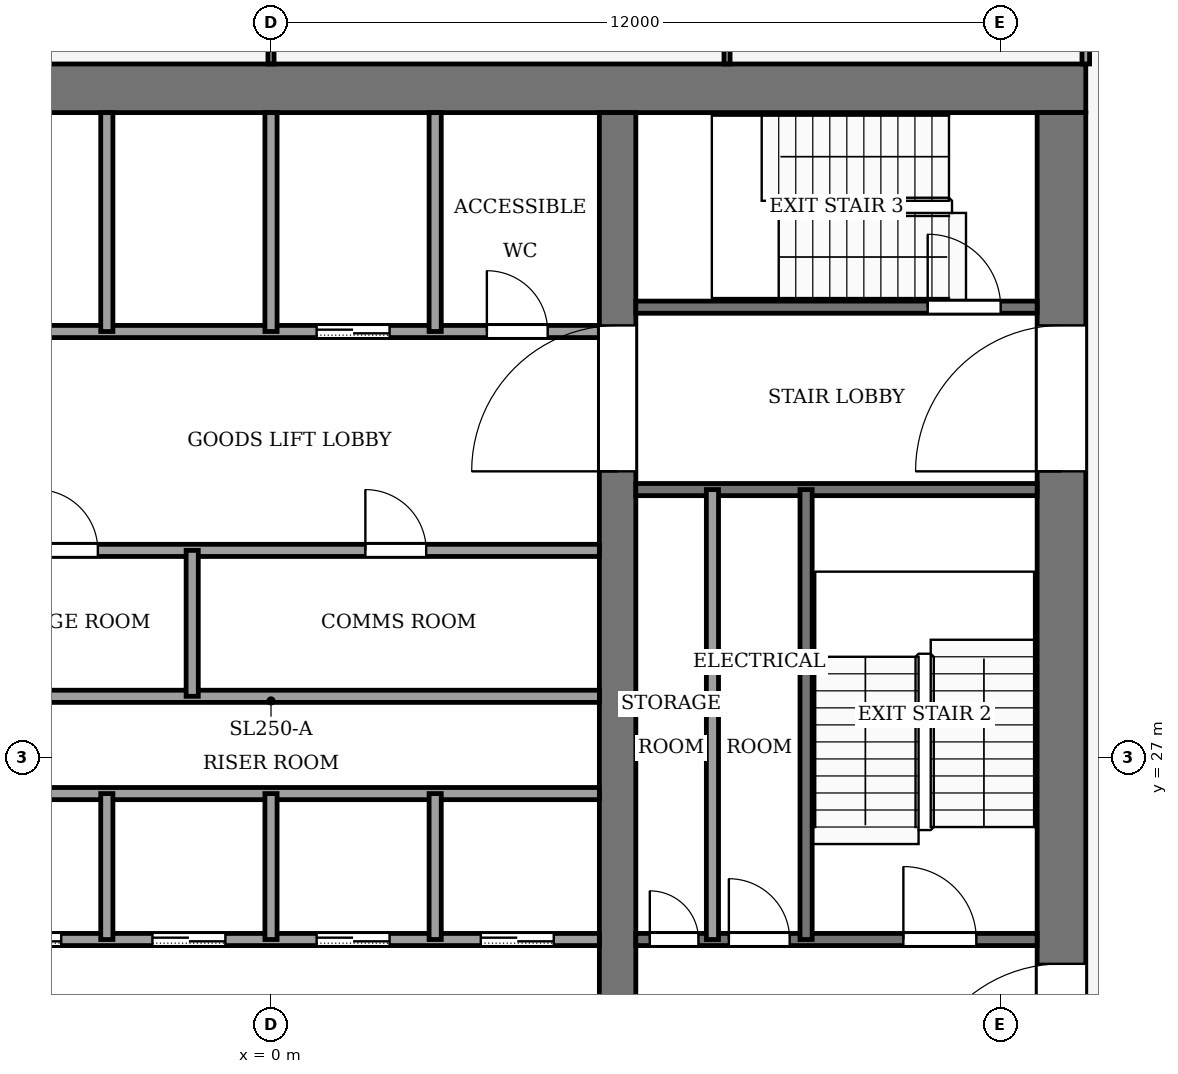
"""IFC4 building model, lengths in metres.
Left out: names, types, materials, properties, quantities, classifications, styles, units other than length and angle.
Written with IfcOpenShell. Run it as: python <this file> out.ifc"""

import sys

from ifc_helpers import new_model, si_unit, direction, frame, frame_2d, origin, place, context, subcontext, project, spatial, rectangle, extrude, element, fill, save


model = new_model("IFC4")
c1 = context("Model", 3, precision=1e-05, world=origin(), true_north=direction((0.0, 1.0)))
c2 = subcontext(c1, "Body", "Model", "MODEL_VIEW")
j1 = project(units=[si_unit("LENGTHUNIT", "METRE"), si_unit("PLANEANGLEUNIT", "RADIAN")], contexts=[c1])
p1 = place(None, origin())
s1 = spatial("IfcSite", under=j1, at=p1, CompositionType="ELEMENT")
p2 = place(p1, origin())
s2 = spatial("IfcBuilding", under=s1, at=p2, CompositionType="ELEMENT")
p3 = place(p2, frame((0.0, 0.0, 250.0)))
s3 = spatial("IfcBuildingStorey", under=s2, at=p3, CompositionType="ELEMENT", Elevation=250.0)
p4 = place(p3, frame((-13.4, 38.0, -0.13), z_axis=(0.0, 0.0, 1.0), x_axis=(1.0, 0.0, 0.0)))
e1 = element("IfcWall", 1, at=p4, inside=s3, PredefinedType="SHEAR", context=c2, shape_type="SweptSolid", body=[
    extrude(rectangle(XDim=26.8, YDim=0.8, at=frame_2d((13.4, 0.0))), origin(), (0.0, 0.0, 1.0), 4.0),
])
p5 = place(p3, frame((13.0, 18.4, -0.13), z_axis=(0.0, 0.0, 1.0), x_axis=(0.0, 1.0, 0.0)))
e2 = element("IfcWall", 2, at=p5, inside=s3, PredefinedType="SHEAR", context=c2, shape_type="SweptSolid", body=[
    extrude(rectangle(XDim=19.2, YDim=0.8, at=frame_2d((9.6, 0.0))), origin(), (0.0, 0.0, 1.0), 4.0),
])
p6 = place(p5, frame((2.8, 0.0, 0.13)))
e3 = element("IfcOpeningElement", 3, at=p6, cuts=e2, PredefinedType="OPENING", context=c2, shape_type="SweptSolid", body=[
    extrude(rectangle(XDim=2.4, YDim=2.4, at=frame_2d((1.2, 1.2))), frame((0.0, 0.41, 0.0), z_axis=(0.0, -1.0, 0.0), x_axis=(1.0, 0.0, 0.0)), (0.0, 0.0, 1.0), 0.82),
])
p7 = place(p5, frame((13.3, 0.0, 0.13)))
e4 = element("IfcOpeningElement", 4, at=p7, cuts=e2, PredefinedType="OPENING", context=c2, shape_type="SweptSolid", body=[
    extrude(rectangle(XDim=2.4, YDim=2.4, at=frame_2d((1.2, 1.2))), frame((0.0, 0.41, 0.0), z_axis=(0.0, -1.0, 0.0), x_axis=(1.0, 0.0, 0.0)), (0.0, 0.0, 1.0), 0.82),
])
p8 = place(p3, frame((5.7, 18.4, -0.13), z_axis=(0.0, 0.0, 1.0), x_axis=(0.0, 1.0, 0.0)))
e5 = element("IfcWall", 5, at=p8, inside=s3, PredefinedType="SHEAR", context=c2, shape_type="SweptSolid", body=[
    extrude(rectangle(XDim=19.2, YDim=0.6, at=frame_2d((9.6, 0.0))), origin(), (0.0, 0.0, 1.0), 4.0),
])
p9 = place(p8, frame((13.3, 0.0, 0.13)))
e6 = element("IfcOpeningElement", 6, at=p9, cuts=e5, PredefinedType="OPENING", context=c2, shape_type="SweptSolid", body=[
    extrude(rectangle(XDim=2.4, YDim=2.4, at=frame_2d((1.2, 1.2))), frame((0.0, 0.31, 0.0), z_axis=(0.0, -1.0, 0.0), x_axis=(1.0, 0.0, 0.0)), (0.0, 0.0, 1.0), 0.62),
])
p10 = place(p3, frame((-5.4, 24.0, 0.0), z_axis=(0.0, 0.0, 1.0), x_axis=(1.0, 0.0, 0.0)))
e7 = element("IfcWall", 7, at=p10, inside=s3, PredefinedType="PARTITIONING", context=c2, shape_type="SweptSolid", body=[
    extrude(rectangle(XDim=10.8, YDim=0.2, at=frame_2d((5.4, 0.0))), origin(), (0.0, 0.0, 1.0), 3.87),
])
p11 = place(p10, frame((0.75, 0.0, 0.0)))
e8 = element("IfcOpeningElement", 8, at=p11, cuts=e7, PredefinedType="OPENING", context=c2, shape_type="SweptSolid", body=[
    extrude(rectangle(XDim=1.2, YDim=2.2, at=frame_2d((0.6, 1.1))), frame((0.0, 0.11, 0.0), z_axis=(0.0, -1.0, 0.0), x_axis=(1.0, 0.0, 0.0)), (0.0, 0.0, 1.0), 0.22),
])
p12 = place(p10, frame((3.45, 0.0, 0.0)))
e9 = element("IfcOpeningElement", 9, at=p12, cuts=e7, PredefinedType="OPENING", context=c2, shape_type="SweptSolid", body=[
    extrude(rectangle(XDim=1.2, YDim=2.2, at=frame_2d((0.6, 1.1))), frame((0.0, 0.11, 0.0), z_axis=(0.0, -1.0, 0.0), x_axis=(1.0, 0.0, 0.0)), (0.0, 0.0, 1.0), 0.22),
])
p13 = place(p10, frame((6.15, 0.0, 0.0)))
e10 = element("IfcOpeningElement", 10, at=p13, cuts=e7, PredefinedType="OPENING", context=c2, shape_type="SweptSolid", body=[
    extrude(rectangle(XDim=1.2, YDim=2.2, at=frame_2d((0.6, 1.1))), frame((0.0, 0.11, 0.0), z_axis=(0.0, -1.0, 0.0), x_axis=(1.0, 0.0, 0.0)), (0.0, 0.0, 1.0), 0.22),
])
p14 = place(p10, frame((8.85, 0.0, 0.0)))
e11 = element("IfcOpeningElement", 11, at=p14, cuts=e7, PredefinedType="OPENING", context=c2, shape_type="SweptSolid", body=[
    extrude(rectangle(XDim=1.2, YDim=2.2, at=frame_2d((0.6, 1.1))), frame((0.0, 0.11, 0.0), z_axis=(0.0, -1.0, 0.0), x_axis=(1.0, 0.0, 0.0)), (0.0, 0.0, 1.0), 0.22),
])
p15 = place(p3, frame((6.0, 24.0, 0.0), z_axis=(0.0, 0.0, 1.0), x_axis=(1.0, 0.0, 0.0)))
e12 = element("IfcWall", 12, at=p15, inside=s3, PredefinedType="PARTITIONING", context=c2, shape_type="SweptSolid", body=[
    extrude(rectangle(XDim=6.6, YDim=0.2, at=frame_2d((3.3, 0.0))), origin(), (0.0, 0.0, 1.0), 3.87),
])
p16 = place(p15, frame((0.23, 0.0, 0.0)))
e13 = element("IfcOpeningElement", 13, at=p16, cuts=e12, PredefinedType="OPENING", context=c2, shape_type="SweptSolid", body=[
    extrude(rectangle(XDim=0.8, YDim=2.1, at=frame_2d((0.4, 1.05))), frame((0.0, 0.11, 0.0), z_axis=(0.0, -1.0, 0.0), x_axis=(1.0, 0.0, 0.0)), (0.0, 0.0, 1.0), 0.22),
])
p17 = place(p15, frame((1.53, 0.0, 0.0)))
e14 = element("IfcOpeningElement", 14, at=p17, cuts=e12, PredefinedType="OPENING", context=c2, shape_type="SweptSolid", body=[
    extrude(rectangle(XDim=1.0, YDim=2.1, at=frame_2d((0.5, 1.05))), frame((0.0, 0.11, 0.0), z_axis=(0.0, -1.0, 0.0), x_axis=(1.0, 0.0, 0.0)), (0.0, 0.0, 1.0), 0.22),
])
p18 = place(p15, frame((4.4, 0.0, 0.0)))
e15 = element("IfcOpeningElement", 15, at=p18, cuts=e12, PredefinedType="OPENING", context=c2, shape_type="SweptSolid", body=[
    extrude(rectangle(XDim=1.2, YDim=2.2, at=frame_2d((0.6, 1.1))), frame((0.0, 0.11, 0.0), z_axis=(0.0, -1.0, 0.0), x_axis=(1.0, 0.0, 0.0)), (0.0, 0.0, 1.0), 0.22),
])
for number, where, z_axis, x_axis in (
    (16, (-5.4, 26.4, 0.0), (0.0, 0.0, 1.0), (1.0, 0.0, 0.0)),
    (17, (-5.4, 28.0, 0.0), (0.0, 0.0, 1.0), (1.0, 0.0, 0.0)),
):
    element("IfcWall", number, at=place(p3, frame(where, z_axis=z_axis, x_axis=x_axis)), inside=s3, PredefinedType="PARTITIONING", context=c2, shape_type="SweptSolid", body=[
        extrude(rectangle(XDim=10.8, YDim=0.2, at=frame_2d((5.4, 0.0))), origin(), (0.0, 0.0, 1.0), 3.87),
    ])
p19 = place(p3, frame((-5.4, 30.4, 0.0), z_axis=(0.0, 0.0, 1.0), x_axis=(1.0, 0.0, 0.0)))
e18 = element("IfcWall", 18, at=p19, inside=s3, PredefinedType="PARTITIONING", context=c2, shape_type="SweptSolid", body=[
    extrude(rectangle(XDim=10.8, YDim=0.2, at=frame_2d((5.4, 0.0))), origin(), (0.0, 0.0, 1.0), 3.87),
])
p20 = place(p19, frame((1.552, 0.0, 0.0)))
e19 = element("IfcOpeningElement", 19, at=p20, cuts=e18, PredefinedType="OPENING", context=c2, shape_type="SweptSolid", body=[
    extrude(rectangle(XDim=1.0, YDim=2.1, at=frame_2d((0.5, 1.05))), frame((0.0, 0.11, 0.0), z_axis=(0.0, -1.0, 0.0), x_axis=(1.0, 0.0, 0.0)), (0.0, 0.0, 1.0), 0.22),
])
p21 = place(p19, frame((6.952, 0.0, 0.0)))
e20 = element("IfcOpeningElement", 20, at=p21, cuts=e18, PredefinedType="OPENING", context=c2, shape_type="SweptSolid", body=[
    extrude(rectangle(XDim=1.0, YDim=2.1, at=frame_2d((0.5, 1.05))), frame((0.0, 0.11, 0.0), z_axis=(0.0, -1.0, 0.0), x_axis=(1.0, 0.0, 0.0)), (0.0, 0.0, 1.0), 0.22),
])
p22 = place(p3, frame((6.0, 31.4, 0.0), z_axis=(0.0, 0.0, 1.0), x_axis=(1.0, 0.0, 0.0)))
e21 = element("IfcWall", 21, at=p22, inside=s3, PredefinedType="PARTITIONING", context=c2, shape_type="SweptSolid", body=[
    extrude(rectangle(XDim=6.6, YDim=0.2, at=frame_2d((3.3, 0.0))), origin(), (0.0, 0.0, 1.0), 3.87),
])
p23 = place(p3, frame((-5.4, 34.0, 0.0), z_axis=(0.0, 0.0, 1.0), x_axis=(1.0, 0.0, 0.0)))
e22 = element("IfcWall", 22, at=p23, inside=s3, PredefinedType="PARTITIONING", context=c2, shape_type="SweptSolid", body=[
    extrude(rectangle(XDim=10.8, YDim=0.2, at=frame_2d((5.4, 0.0))), origin(), (0.0, 0.0, 1.0), 3.87),
])
p24 = place(p23, frame((6.15, 0.0, 0.0)))
e23 = element("IfcOpeningElement", 23, at=p24, cuts=e22, PredefinedType="OPENING", context=c2, shape_type="SweptSolid", body=[
    extrude(rectangle(XDim=1.2, YDim=2.2, at=frame_2d((0.6, 1.1))), frame((0.0, 0.11, 0.0), z_axis=(0.0, -1.0, 0.0), x_axis=(1.0, 0.0, 0.0)), (0.0, 0.0, 1.0), 0.22),
])
p25 = place(p23, frame((8.95, 0.0, 0.0)))
e24 = element("IfcOpeningElement", 24, at=p25, cuts=e22, PredefinedType="OPENING", context=c2, shape_type="SweptSolid", body=[
    extrude(rectangle(XDim=1.0, YDim=2.1, at=frame_2d((0.5, 1.05))), frame((0.0, 0.11, 0.0), z_axis=(0.0, -1.0, 0.0), x_axis=(1.0, 0.0, 0.0)), (0.0, 0.0, 1.0), 0.22),
])
p26 = place(p3, frame((6.0, 34.4, 0.0), z_axis=(0.0, 0.0, 1.0), x_axis=(1.0, 0.0, 0.0)))
e25 = element("IfcWall", 25, at=p26, inside=s3, PredefinedType="PARTITIONING", context=c2, shape_type="SweptSolid", body=[
    extrude(rectangle(XDim=6.6, YDim=0.2, at=frame_2d((3.3, 0.0))), origin(), (0.0, 0.0, 1.0), 3.87),
])
p27 = place(p26, frame((4.8, 0.0, 0.0)))
e26 = element("IfcOpeningElement", 26, at=p27, cuts=e25, PredefinedType="OPENING", context=c2, shape_type="SweptSolid", body=[
    extrude(rectangle(XDim=1.2, YDim=2.2, at=frame_2d((0.6, 1.1))), frame((0.0, 0.11, 0.0), z_axis=(0.0, -1.0, 0.0), x_axis=(1.0, 0.0, 0.0)), (0.0, 0.0, 1.0), 0.22),
])
p28 = place(p3, frame((-2.7, 24.0, 0.0), z_axis=(0.0, 0.0, 1.0), x_axis=(0.0, 1.0, 0.0)))
e27 = element("IfcWall", 27, at=p28, inside=s3, PredefinedType="PARTITIONING", context=c2, shape_type="SweptSolid", body=[
    extrude(rectangle(XDim=2.4, YDim=0.2, at=frame_2d((1.2, 0.0))), origin(), (0.0, 0.0, 1.0), 3.87),
])
p29 = place(p3, frame((-2.7, 34.0, 0.0), z_axis=(0.0, 0.0, 1.0), x_axis=(0.0, 1.0, 0.0)))
e28 = element("IfcWall", 28, at=p29, inside=s3, PredefinedType="PARTITIONING", context=c2, shape_type="SweptSolid", body=[
    extrude(rectangle(XDim=3.6, YDim=0.2, at=frame_2d((1.8, 0.0))), origin(), (0.0, 0.0, 1.0), 3.87),
])
for number, where, z_axis, x_axis in (
    (29, (-1.296, 28.0, 0.0), (0.0, 0.0, 1.0), (0.0, 1.0, 0.0)),
    (30, (0.0, 24.0, 0.0), (0.0, 0.0, 1.0), (0.0, 1.0, 0.0)),
):
    element("IfcWall", number, at=place(p3, frame(where, z_axis=z_axis, x_axis=x_axis)), inside=s3, PredefinedType="PARTITIONING", context=c2, shape_type="SweptSolid", body=[
        extrude(rectangle(XDim=2.4, YDim=0.2, at=frame_2d((1.2, 0.0))), origin(), (0.0, 0.0, 1.0), 3.87),
    ])
p30 = place(p3, frame((0.0, 34.0, 0.0), z_axis=(0.0, 0.0, 1.0), x_axis=(0.0, 1.0, 0.0)))
e31 = element("IfcWall", 31, at=p30, inside=s3, PredefinedType="PARTITIONING", context=c2, shape_type="SweptSolid", body=[
    extrude(rectangle(XDim=3.6, YDim=0.2, at=frame_2d((1.8, 0.0))), origin(), (0.0, 0.0, 1.0), 3.87),
])
p31 = place(p3, frame((2.7, 24.0, 0.0), z_axis=(0.0, 0.0, 1.0), x_axis=(0.0, 1.0, 0.0)))
e32 = element("IfcWall", 32, at=p31, inside=s3, PredefinedType="PARTITIONING", context=c2, shape_type="SweptSolid", body=[
    extrude(rectangle(XDim=2.4, YDim=0.2, at=frame_2d((1.2, 0.0))), origin(), (0.0, 0.0, 1.0), 3.87),
])
p32 = place(p3, frame((2.7, 34.0, 0.0), z_axis=(0.0, 0.0, 1.0), x_axis=(0.0, 1.0, 0.0)))
e33 = element("IfcWall", 33, at=p32, inside=s3, PredefinedType="PARTITIONING", context=c2, shape_type="SweptSolid", body=[
    extrude(rectangle(XDim=3.6, YDim=0.2, at=frame_2d((1.8, 0.0))), origin(), (0.0, 0.0, 1.0), 3.87),
])
for number, where, z_axis, x_axis in (
    (34, (7.26, 24.0, 0.0), (0.0, 0.0, 1.0), (0.0, 1.0, 0.0)),
    (35, (8.8, 24.0, 0.0), (0.0, 0.0, 1.0), (0.0, 1.0, 0.0)),
):
    element("IfcWall", number, at=place(p3, frame(where, z_axis=z_axis, x_axis=x_axis)), inside=s3, PredefinedType="PARTITIONING", context=c2, shape_type="SweptSolid", body=[
        extrude(rectangle(XDim=7.4, YDim=0.2, at=frame_2d((3.7, 0.0))), origin(), (0.0, 0.0, 1.0), 3.87),
    ])
p33 = place(p3, frame((13.4, 38.4, 0.0), z_axis=(0.0, 0.0, 1.0), x_axis=(0.0, 1.0, 0.0)))
e36 = element("IfcWall", 36, at=p33, inside=s3, PredefinedType="PARTITIONING", context=c2, shape_type="SweptSolid", body=[
    extrude(rectangle(XDim=5.1, YDim=0.125, at=frame_2d((2.55, 0.0))), origin(), (0.0, 0.0, 1.0), 3.14),
])
p34 = place(p33, frame((2.05, 0.0, 0.0)))
e37 = element("IfcOpeningElement", 37, at=p34, cuts=e36, PredefinedType="OPENING", context=c2, shape_type="SweptSolid", body=[
    extrude(rectangle(XDim=1.0, YDim=2.1, at=frame_2d((0.5, 1.05))), frame((0.0, 0.073, 0.0), z_axis=(0.0, -1.0, 0.0), x_axis=(1.0, 0.0, 0.0)), (0.0, 0.0, 1.0), 0.145),
])
p35 = place(p3, frame((0.0, 38.4, 0.0), z_axis=(0.0, 0.0, 1.0), x_axis=(0.0, 1.0, 0.0)))
e38 = element("IfcWall", 38, at=p35, inside=s3, PredefinedType="PARTITIONING", context=c2, shape_type="SweptSolid", body=[
    extrude(rectangle(XDim=8.104, YDim=0.1, at=frame_2d((4.052, 0.0))), origin(), (0.0, 0.0, 1.0), 3.44),
])
p36 = place(p3, frame((7.5, 43.504, 0.0), z_axis=(0.0, 0.0, 1.0), x_axis=(0.0, -1.0, 0.0)))
e39 = element("IfcWall", 39, at=p36, inside=s3, PredefinedType="PARTITIONING", context=c2, shape_type="SweptSolid", body=[
    extrude(rectangle(XDim=5.104, YDim=0.1, at=frame_2d((2.552, 0.0))), origin(), (0.0, 0.0, 1.0), 3.87),
])
p37 = place(p11, origin())
e40 = element("IfcDoor", 40, at=p37, inside=s3, OperationType="SLIDING_TO_LEFT", PredefinedType="DOOR", context=c2, shape_type="SweptSolid", body=[
    extrude(rectangle(XDim=1.2, YDim=2.2, at=frame_2d((0.6, 1.1))), frame((0.0, 0.025, 0.0), z_axis=(0.0, -1.0, 0.0), x_axis=(1.0, 0.0, 0.0)), (0.0, 0.0, 1.0), 0.05),
])
fill(e8, e40)
p38 = place(p12, origin())
e41 = element("IfcDoor", 41, at=p38, inside=s3, OperationType="SLIDING_TO_LEFT", PredefinedType="DOOR", context=c2, shape_type="SweptSolid", body=[
    extrude(rectangle(XDim=1.2, YDim=2.2, at=frame_2d((0.6, 1.1))), frame((0.0, 0.025, 0.0), z_axis=(0.0, -1.0, 0.0), x_axis=(1.0, 0.0, 0.0)), (0.0, 0.0, 1.0), 0.05),
])
fill(e9, e41)
p39 = place(p13, origin())
e42 = element("IfcDoor", 42, at=p39, inside=s3, OperationType="SLIDING_TO_LEFT", PredefinedType="DOOR", context=c2, shape_type="SweptSolid", body=[
    extrude(rectangle(XDim=1.2, YDim=2.2, at=frame_2d((0.6, 1.1))), frame((0.0, 0.025, 0.0), z_axis=(0.0, -1.0, 0.0), x_axis=(1.0, 0.0, 0.0)), (0.0, 0.0, 1.0), 0.05),
])
fill(e10, e42)
p40 = place(p14, origin())
e43 = element("IfcDoor", 43, at=p40, inside=s3, OperationType="SLIDING_TO_LEFT", PredefinedType="DOOR", context=c2, shape_type="SweptSolid", body=[
    extrude(rectangle(XDim=1.2, YDim=2.2, at=frame_2d((0.6, 1.1))), frame((0.0, 0.025, 0.0), z_axis=(0.0, -1.0, 0.0), x_axis=(1.0, 0.0, 0.0)), (0.0, 0.0, 1.0), 0.05),
])
fill(e11, e43)
p41 = place(p24, origin())
e44 = element("IfcDoor", 44, at=p41, inside=s3, OperationType="SLIDING_TO_LEFT", PredefinedType="DOOR", context=c2, shape_type="SweptSolid", body=[
    extrude(rectangle(XDim=1.2, YDim=2.2, at=frame_2d((0.6, 1.1))), frame((0.0, 0.025, 0.0), z_axis=(0.0, -1.0, 0.0), x_axis=(1.0, 0.0, 0.0)), (0.0, 0.0, 1.0), 0.05),
])
fill(e23, e44)
p42 = place(p20, origin())
e45 = element("IfcDoor", 45, at=p42, inside=s3, OperationType="SINGLE_SWING_LEFT", PredefinedType="DOOR", context=c2, shape_type="SweptSolid", body=[
    extrude(rectangle(XDim=1.0, YDim=2.1, at=frame_2d((0.5, 1.05))), frame((0.0, 0.025, 0.0), z_axis=(0.0, -1.0, 0.0), x_axis=(1.0, 0.0, 0.0)), (0.0, 0.0, 1.0), 0.05),
])
fill(e19, e45)
p43 = place(p21, origin())
e46 = element("IfcDoor", 46, at=p43, inside=s3, OperationType="SINGLE_SWING_RIGHT", PredefinedType="DOOR", context=c2, shape_type="SweptSolid", body=[
    extrude(rectangle(XDim=1.0, YDim=2.1, at=frame_2d((0.5, 1.05))), frame((0.0, 0.025, 0.0), z_axis=(0.0, -1.0, 0.0), x_axis=(1.0, 0.0, 0.0)), (0.0, 0.0, 1.0), 0.05),
])
fill(e20, e46)
p44 = place(p16, origin())
e47 = element("IfcDoor", 47, at=p44, inside=s3, OperationType="SINGLE_SWING_RIGHT", PredefinedType="DOOR", context=c2, shape_type="SweptSolid", body=[
    extrude(rectangle(XDim=0.8, YDim=2.1, at=frame_2d((0.4, 1.05))), frame((0.0, 0.025, 0.0), z_axis=(0.0, -1.0, 0.0), x_axis=(1.0, 0.0, 0.0)), (0.0, 0.0, 1.0), 0.05),
])
fill(e13, e47)
p45 = place(p17, origin())
e48 = element("IfcDoor", 48, at=p45, inside=s3, OperationType="SINGLE_SWING_LEFT", PredefinedType="DOOR", context=c2, shape_type="SweptSolid", body=[
    extrude(rectangle(XDim=1.0, YDim=2.1, at=frame_2d((0.5, 1.05))), frame((0.0, 0.025, 0.0), z_axis=(0.0, -1.0, 0.0), x_axis=(1.0, 0.0, 0.0)), (0.0, 0.0, 1.0), 0.05),
])
fill(e14, e48)
p46 = place(p25, origin())
e49 = element("IfcDoor", 49, at=p46, inside=s3, OperationType="SINGLE_SWING_LEFT", PredefinedType="DOOR", context=c2, shape_type="SweptSolid", body=[
    extrude(rectangle(XDim=1.0, YDim=2.1, at=frame_2d((0.5, 1.05))), frame((0.0, 0.025, 0.0), z_axis=(0.0, -1.0, 0.0), x_axis=(1.0, 0.0, 0.0)), (0.0, 0.0, 1.0), 0.05),
])
fill(e24, e49)
p47 = place(p18, origin())
e50 = element("IfcDoor", 50, at=p47, inside=s3, OperationType="SINGLE_SWING_LEFT", PredefinedType="DOOR", context=c2, shape_type="SweptSolid", body=[
    extrude(rectangle(XDim=1.2, YDim=2.2, at=frame_2d((0.6, 1.1))), frame((0.0, 0.025, 0.0), z_axis=(0.0, -1.0, 0.0), x_axis=(1.0, 0.0, 0.0)), (0.0, 0.0, 1.0), 0.05),
])
fill(e15, e50)
p48 = place(p27, origin())
e51 = element("IfcDoor", 51, at=p48, inside=s3, OperationType="SINGLE_SWING_RIGHT", PredefinedType="DOOR", context=c2, shape_type="SweptSolid", body=[
    extrude(rectangle(XDim=1.2, YDim=2.2, at=frame_2d((0.6, 1.1))), frame((0.0, 0.025, 0.0), z_axis=(0.0, -1.0, 0.0), x_axis=(1.0, 0.0, 0.0)), (0.0, 0.0, 1.0), 0.05),
])
fill(e26, e51)
p49 = place(p9, origin())
e52 = element("IfcDoor", 52, at=p49, inside=s3, OperationType="DOUBLE_DOOR_SINGLE_SWING", PredefinedType="DOOR", context=c2, shape_type="SweptSolid", body=[
    extrude(rectangle(XDim=2.4, YDim=2.4, at=frame_2d((1.2, 1.2))), frame((0.0, 0.025, 0.0), z_axis=(0.0, -1.0, 0.0), x_axis=(1.0, 0.0, 0.0)), (0.0, 0.0, 1.0), 0.05),
])
fill(e6, e52)
p50 = place(p6, origin())
e53 = element("IfcDoor", 53, at=p50, inside=s3, OperationType="DOUBLE_DOOR_SINGLE_SWING", PredefinedType="DOOR", context=c2, shape_type="SweptSolid", body=[
    extrude(rectangle(XDim=2.4, YDim=2.4, at=frame_2d((1.2, 1.2))), frame((0.0, 0.025, 0.0), z_axis=(0.0, -1.0, 0.0), x_axis=(1.0, 0.0, 0.0)), (0.0, 0.0, 1.0), 0.05),
])
fill(e3, e53)
p51 = place(p7, origin())
e54 = element("IfcDoor", 54, at=p51, inside=s3, OperationType="DOUBLE_DOOR_SINGLE_SWING", PredefinedType="DOOR", context=c2, shape_type="SweptSolid", body=[
    extrude(rectangle(XDim=2.4, YDim=2.4, at=frame_2d((1.2, 1.2))), frame((0.0, 0.025, 0.0), z_axis=(0.0, -1.0, 0.0), x_axis=(1.0, 0.0, 0.0)), (0.0, 0.0, 1.0), 0.05),
])
fill(e4, e54)
save(model, sys.argv[1])
